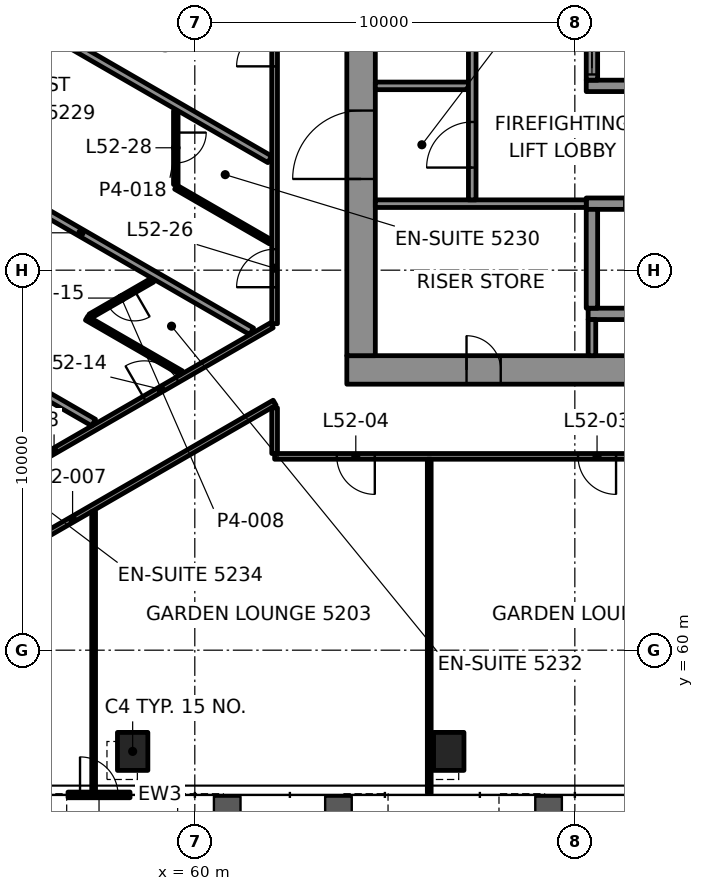
"""IFC4 building model, lengths in metres.
Left out: names, types, materials, properties, quantities, classifications, styles, units other than length and angle.
Written with IfcOpenShell. Run it as: python <this file> out.ifc"""

import sys

from ifc_helpers import new_model, si_unit, direction, frame, frame_2d, origin, origin_2d, place, context, subcontext, project, spatial, rectangle, hollow_rectangle, extrude, element, fill, save


model = new_model("IFC4")
c1 = context("Model", 3, precision=1e-05, world=origin(), true_north=direction((0.0, 1.0)))
c2 = subcontext(c1, "Body", "Model", "MODEL_VIEW")
j1 = project(units=[si_unit("LENGTHUNIT", "METRE"), si_unit("PLANEANGLEUNIT", "RADIAN")], contexts=[c1])
p1 = place(None, origin())
s1 = spatial("IfcSite", under=j1, at=p1, CompositionType="ELEMENT")
p2 = place(p1, origin())
s2 = spatial("IfcBuilding", under=s1, at=p2, CompositionType="ELEMENT")
p3 = place(p2, frame((0.0, 0.0, 222.1)))
s3 = spatial("IfcBuildingStorey", under=s2, at=p3, CompositionType="ELEMENT", Elevation=222.1)
for number, where, z_axis, x_axis in (
    (1, (58.365, 57.337, -0.0), (0.0, 0.0, 1.0), (1.0, 0.0, 0.0)),
    (2, (66.682, 57.337, -0.0), (0.0, 0.0, 1.0), (1.0, 0.0, 0.0)),
):
    element("IfcColumn", number, at=place(p3, frame(where, z_axis=z_axis, x_axis=x_axis)), inside=s3, PredefinedType="COLUMN", context=c2, shape_type="SweptSolid", body=[
        extrude(hollow_rectangle(XDim=0.8, YDim=1.0, WallThickness=0.05, at=origin_2d()), origin(), (0.0, 0.0, 1.0), 3.9),
    ])
p4 = place(p3, frame((64.0, 67.375, 0.0), z_axis=(0.0, 0.0, 1.0), x_axis=(1.0, 0.0, 0.0)))
e3 = element("IfcWall", 3, at=p4, inside=s3, PredefinedType="SHEAR", context=c2, shape_type="SweptSolid", body=[
    extrude(rectangle(XDim=22.0, YDim=0.75, at=frame_2d((11.0, 0.0))), origin(), (0.0, 0.0, 1.0), 3.7),
])
p5 = place(p4, frame((3.15, 0.0, 0.0)))
e4 = element("IfcOpeningElement", 4, at=p5, cuts=e3, PredefinedType="OPENING", context=c2, shape_type="SweptSolid", body=[
    extrude(rectangle(XDim=0.9, YDim=2.1, at=frame_2d((0.45, 1.05))), frame((0.0, 0.385, 0.0), z_axis=(0.0, -1.0, 0.0), x_axis=(1.0, 0.0, 0.0)), (0.0, 0.0, 1.0), 0.77),
])
p6 = place(p3, frame((64.375, 67.75, 0.0), z_axis=(0.0, 0.0, 1.0), x_axis=(0.0, 1.0, 0.0)))
e5 = element("IfcWall", 5, at=p6, inside=s3, PredefinedType="SHEAR", context=c2, shape_type="SweptSolid", body=[
    extrude(rectangle(XDim=14.5, YDim=0.75, at=frame_2d((7.25, 0.0))), origin(), (0.0, 0.0, 1.0), 3.7),
])
p7 = place(p6, frame((4.65, 0.0, 0.0)))
e6 = element("IfcOpeningElement", 6, at=p7, cuts=e5, PredefinedType="OPENING", context=c2, shape_type="SweptSolid", body=[
    extrude(rectangle(XDim=1.8, YDim=2.1, at=frame_2d((0.9, 1.05))), frame((0.0, 0.385, 0.0), z_axis=(0.0, -1.0, 0.0), x_axis=(1.0, 0.0, 0.0)), (0.0, 0.0, 1.0), 0.77),
])
p8 = place(p6, frame((8.5, 0.0, 0.0)))
e7 = element("IfcOpeningElement", 7, at=p8, cuts=e5, PredefinedType="OPENING", context=c2, shape_type="SweptSolid", body=[
    extrude(rectangle(XDim=0.9, YDim=2.1, at=frame_2d((0.45, 1.05))), frame((0.0, 0.385, 0.0), z_axis=(0.0, -1.0, 0.0), x_axis=(1.0, 0.0, 0.0)), (0.0, 0.0, 1.0), 0.77),
])
p9 = place(p6, frame((12.2, 0.0, 0.0)))
e8 = element("IfcOpeningElement", 8, at=p9, cuts=e5, PredefinedType="OPENING", context=c2, shape_type="SweptSolid", body=[
    extrude(rectangle(XDim=0.9, YDim=2.1, at=frame_2d((0.45, 1.05))), frame((0.0, 0.385, 0.0), z_axis=(0.0, -1.0, 0.0), x_axis=(1.0, 0.0, 0.0)), (0.0, 0.0, 1.0), 0.77),
])
p10 = place(p3, frame((70.35, 68.85, 0.0), z_axis=(0.0, 0.0, 1.0), x_axis=(1.0, 0.0, 0.0)))
e9 = element("IfcWall", 9, at=p10, inside=s3, PredefinedType="SHEAR", context=c2, shape_type="SweptSolid", body=[
    extrude(rectangle(XDim=14.2, YDim=0.3, at=frame_2d((7.1, 0.0))), origin(), (0.0, 0.0, 1.0), 3.7),
])
p11 = place(p3, frame((70.3, 71.75, 0.0), z_axis=(0.0, 0.0, 1.0), x_axis=(1.0, 0.0, 0.0)))
e10 = element("IfcWall", 10, at=p11, inside=s3, PredefinedType="SHEAR", context=c2, shape_type="SweptSolid", body=[
    extrude(rectangle(XDim=14.3, YDim=0.3, at=frame_2d((7.15, 0.0))), origin(), (0.0, 0.0, 1.0), 3.7),
])
p12 = place(p11, frame((1.0, 0.0, 0.0)))
e11 = element("IfcOpeningElement", 11, at=p12, cuts=e10, PredefinedType="OPENING", context=c2, shape_type="SweptSolid", body=[
    extrude(rectangle(XDim=1.1, YDim=2.1, at=frame_2d((0.55, 1.05))), frame((0.0, 0.16, 0.0), z_axis=(0.0, -1.0, 0.0), x_axis=(1.0, 0.0, 0.0)), (0.0, 0.0, 1.0), 0.32),
])
p13 = place(p11, frame((3.8, 0.0, 0.0)))
e12 = element("IfcOpeningElement", 12, at=p13, cuts=e10, PredefinedType="OPENING", context=c2, shape_type="SweptSolid", body=[
    extrude(rectangle(XDim=1.1, YDim=2.1, at=frame_2d((0.55, 1.05))), frame((0.0, 0.16, 0.0), z_axis=(0.0, -1.0, 0.0), x_axis=(1.0, 0.0, 0.0)), (0.0, 0.0, 1.0), 0.32),
])
p14 = place(p11, frame((6.6, 0.0, 0.0)))
e13 = element("IfcOpeningElement", 13, at=p14, cuts=e10, PredefinedType="OPENING", context=c2, shape_type="SweptSolid", body=[
    extrude(rectangle(XDim=1.1, YDim=2.1, at=frame_2d((0.55, 1.05))), frame((0.0, 0.16, 0.0), z_axis=(0.0, -1.0, 0.0), x_axis=(1.0, 0.0, 0.0)), (0.0, 0.0, 1.0), 0.32),
])
p15 = place(p11, frame((9.4, 0.0, 0.0)))
e14 = element("IfcOpeningElement", 14, at=p15, cuts=e10, PredefinedType="OPENING", context=c2, shape_type="SweptSolid", body=[
    extrude(rectangle(XDim=1.1, YDim=2.1, at=frame_2d((0.55, 1.05))), frame((0.0, 0.16, 0.0), z_axis=(0.0, -1.0, 0.0), x_axis=(1.0, 0.0, 0.0)), (0.0, 0.0, 1.0), 0.32),
])
p16 = place(p11, frame((12.2, 0.0, 0.0)))
e15 = element("IfcOpeningElement", 15, at=p16, cuts=e10, PredefinedType="OPENING", context=c2, shape_type="SweptSolid", body=[
    extrude(rectangle(XDim=1.1, YDim=2.1, at=frame_2d((0.55, 1.05))), frame((0.0, 0.16, 0.0), z_axis=(0.0, -1.0, 0.0), x_axis=(1.0, 0.0, 0.0)), (0.0, 0.0, 1.0), 0.32),
])
p17 = place(p3, frame((70.3, 74.85, 0.0), z_axis=(0.0, 0.0, 1.0), x_axis=(1.0, 0.0, 0.0)))
e16 = element("IfcWall", 16, at=p17, inside=s3, PredefinedType="SHEAR", context=c2, shape_type="SweptSolid", body=[
    extrude(rectangle(XDim=14.3, YDim=0.3, at=frame_2d((7.15, 0.0))), origin(), (0.0, 0.0, 1.0), 3.7),
])
p18 = place(p17, frame((3.8, 0.0, 0.0)))
e17 = element("IfcOpeningElement", 17, at=p18, cuts=e16, PredefinedType="OPENING", context=c2, shape_type="SweptSolid", body=[
    extrude(rectangle(XDim=1.1, YDim=2.1, at=frame_2d((0.55, 1.05))), frame((0.0, 0.16, 0.0), z_axis=(0.0, -1.0, 0.0), x_axis=(1.0, 0.0, 0.0)), (0.0, 0.0, 1.0), 0.32),
])
p19 = place(p17, frame((12.2, 0.0, 0.0)))
e18 = element("IfcOpeningElement", 18, at=p19, cuts=e16, PredefinedType="OPENING", context=c2, shape_type="SweptSolid", body=[
    extrude(rectangle(XDim=1.1, YDim=2.1, at=frame_2d((0.55, 1.05))), frame((0.0, 0.16, 0.0), z_axis=(0.0, -1.0, 0.0), x_axis=(1.0, 0.0, 0.0)), (0.0, 0.0, 1.0), 0.32),
])
p20 = place(p3, frame((70.45, 69.0, 0.0), z_axis=(0.0, 0.0, 1.0), x_axis=(0.0, 1.0, 0.0)))
e19 = element("IfcWall", 19, at=p20, inside=s3, PredefinedType="SHEAR", context=c2, shape_type="SweptSolid", body=[
    extrude(rectangle(XDim=2.6, YDim=0.3, at=frame_2d((1.3, 0.0))), origin(), (0.0, 0.0, 1.0), 3.7),
])
p21 = place(p3, frame((70.45, 75.0, 0.0), z_axis=(0.0, 0.0, 1.0), x_axis=(0.0, 1.0, 0.0)))
e20 = element("IfcWall", 20, at=p21, inside=s3, PredefinedType="SHEAR", context=c2, shape_type="SweptSolid", body=[
    extrude(rectangle(XDim=2.6, YDim=0.3, at=frame_2d((1.3, 0.0))), origin(), (0.0, 0.0, 1.0), 3.7),
])
p22 = place(p21, frame((0.15, 0.0, 0.0)))
e21 = element("IfcOpeningElement", 21, at=p22, cuts=e20, PredefinedType="OPENING", context=c2, shape_type="SweptSolid", body=[
    extrude(rectangle(XDim=1.1, YDim=2.1, at=frame_2d((0.55, 1.05))), frame((0.0, 0.16, 0.0), z_axis=(0.0, -1.0, 0.0), x_axis=(1.0, 0.0, 0.0)), (0.0, 0.0, 1.0), 0.32),
])
p23 = place(p3, frame((87.899, 65.1, 0.0), z_axis=(0.0, 0.0, 1.0), x_axis=(-1.0, 0.0, 0.0)))
e22 = element("IfcWall", 22, at=p23, inside=s3, PredefinedType="PARTITIONING", context=c2, shape_type="SweptSolid", body=[
    extrude(rectangle(XDim=25.799, YDim=0.15, at=frame_2d((12.899, 0.0))), origin(), (0.0, 0.0, 1.0), 3.1),
])
p24 = place(p23, frame((1.636, 0.0, 0.0)))
e23 = element("IfcOpeningElement", 23, at=p24, cuts=e22, PredefinedType="OPENING", context=c2, shape_type="SweptSolid", body=[
    extrude(rectangle(XDim=1.0, YDim=2.1, at=frame_2d((0.5, 1.05))), frame((0.0, 0.085, 0.0), z_axis=(0.0, -1.0, 0.0), x_axis=(1.0, 0.0, 0.0)), (0.0, 0.0, 1.0), 0.17),
])
p25 = place(p23, frame((7.984, 0.0, 0.0)))
e24 = element("IfcOpeningElement", 24, at=p25, cuts=e22, PredefinedType="OPENING", context=c2, shape_type="SweptSolid", body=[
    extrude(rectangle(XDim=1.0, YDim=2.1, at=frame_2d((0.5, 1.05))), frame((0.0, 0.085, 0.0), z_axis=(0.0, -1.0, 0.0), x_axis=(1.0, 0.0, 0.0)), (0.0, 0.0, 1.0), 0.17),
])
p26 = place(p23, frame((16.815, 0.0, 0.0)))
e25 = element("IfcOpeningElement", 25, at=p26, cuts=e22, PredefinedType="OPENING", context=c2, shape_type="SweptSolid", body=[
    extrude(rectangle(XDim=1.0, YDim=2.1, at=frame_2d((0.5, 1.05))), frame((0.0, 0.085, 0.0), z_axis=(0.0, -1.0, 0.0), x_axis=(1.0, 0.0, 0.0)), (0.0, 0.0, 1.0), 0.17),
])
p27 = place(p23, frame((23.163, 0.0, 0.0)))
e26 = element("IfcOpeningElement", 26, at=p27, cuts=e22, PredefinedType="OPENING", context=c2, shape_type="SweptSolid", body=[
    extrude(rectangle(XDim=1.0, YDim=2.1, at=frame_2d((0.5, 1.05))), frame((0.0, 0.085, 0.0), z_axis=(0.0, -1.0, 0.0), x_axis=(1.0, 0.0, 0.0)), (0.0, 0.0, 1.0), 0.17),
])
p28 = place(p3, frame((62.1, 66.513, 0.0), z_axis=(0.0, 0.0, 1.0), x_axis=(-0.866027942666, -0.499995602502, 0.0)))
e27 = element("IfcWall", 27, at=p28, inside=s3, PredefinedType="PARTITIONING", context=c2, shape_type="SweptSolid", body=[
    extrude(rectangle(XDim=12.276, YDim=0.15, at=frame_2d((6.138, 0.0))), origin(), (0.0, 0.0, 1.0), 2.947),
])
p29 = place(p28, frame((8.286, 0.0, 0.0)))
e28 = element("IfcOpeningElement", 28, at=p29, cuts=e27, PredefinedType="OPENING", context=c2, shape_type="SweptSolid", body=[
    extrude(rectangle(XDim=1.0, YDim=2.1, at=frame_2d((0.5, 1.05))), frame((0.0, 0.085, 0.0), z_axis=(0.0, -1.0, 0.0), x_axis=(1.0, 0.0, 0.0)), (0.0, 0.0, 1.0), 0.17),
])
p30 = place(p3, frame((50.569, 61.934, 0.0), z_axis=(0.0, 0.0, 1.0), x_axis=(0.866030071145, 0.499991915808, 0.0)))
e29 = element("IfcWall", 29, at=p30, inside=s3, PredefinedType="PARTITIONING", context=c2, shape_type="SweptSolid", body=[
    extrude(rectangle(XDim=13.228, YDim=0.15, at=frame_2d((6.614, 0.0))), origin(), (0.0, 0.0, 1.0), 3.1),
])
p31 = place(p30, frame((1.597, 0.0, 0.0)))
e30 = element("IfcOpeningElement", 30, at=p31, cuts=e29, PredefinedType="OPENING", context=c2, shape_type="SweptSolid", body=[
    extrude(rectangle(XDim=1.0, YDim=2.1, at=frame_2d((0.5, 1.05))), frame((0.0, 0.085, 0.0), z_axis=(0.0, -1.0, 0.0), x_axis=(1.0, 0.0, 0.0)), (0.0, 0.0, 1.0), 0.17),
])
p32 = place(p30, frame((9.36, 0.0, 0.0)))
e31 = element("IfcOpeningElement", 31, at=p32, cuts=e29, PredefinedType="OPENING", context=c2, shape_type="SweptSolid", body=[
    extrude(rectangle(XDim=1.0, YDim=2.1, at=frame_2d((0.5, 1.05))), frame((0.0, 0.085, 0.0), z_axis=(0.0, -1.0, 0.0), x_axis=(1.0, 0.0, 0.0)), (0.0, 0.0, 1.0), 0.17),
])
p33 = place(p3, frame((58.889, 69.74, 0.0), z_axis=(0.0, 0.0, 1.0), x_axis=(-0.866039783157, -0.499975093369, 0.0)))
e32 = element("IfcWall", 32, at=p33, inside=s3, PredefinedType="PARTITIONING", context=c2, shape_type="SweptSolid", body=[
    extrude(rectangle(XDim=1.896, YDim=0.12, at=frame_2d((0.948, 0.0))), origin(), (0.0, 0.0, 1.0), 3.1),
])
p34 = place(p33, frame((0.548, 0.0, 0.0)))
e33 = element("IfcOpeningElement", 33, at=p34, cuts=e32, PredefinedType="OPENING", context=c2, shape_type="SweptSolid", body=[
    extrude(rectangle(XDim=0.8, YDim=2.1, at=frame_2d((0.4, 1.05))), frame((0.0, 0.07, 0.0), z_axis=(0.0, -1.0, 0.0), x_axis=(1.0, 0.0, 0.0)), (0.0, 0.0, 1.0), 0.14),
])
p35 = place(p3, frame((66.169, 56.237, 0.0), z_axis=(0.0, 0.0, 1.0), x_axis=(0.0, 1.0, 0.0)))
e34 = element("IfcWall", 34, at=p35, inside=s3, PredefinedType="PARTITIONING", context=c2, shape_type="SweptSolid", body=[
    extrude(rectangle(XDim=8.788, YDim=0.1, at=frame_2d((4.394, 0.0))), origin(), (0.0, 0.0, 1.0), 3.022),
])
p36 = place(p3, frame((62.1, 65.176, 0.0), z_axis=(0.0, 0.0, 1.0), x_axis=(0.0, 1.0, 0.0)))
e35 = element("IfcWall", 35, at=p36, inside=s3, PredefinedType="PARTITIONING", context=c2, shape_type="SweptSolid", body=[
    extrude(rectangle(XDim=1.201, YDim=0.15, at=frame_2d((0.6, 0.0))), origin(), (0.0, 0.0, 1.0), 2.947),
])
p37 = place(p3, frame((62.1, 68.591, 0.0), z_axis=(0.0, 0.0, 1.0), x_axis=(0.0, 1.0, 0.0)))
e36 = element("IfcWall", 36, at=p37, inside=s3, PredefinedType="PARTITIONING", context=c2, shape_type="SweptSolid", body=[
    extrude(rectangle(XDim=16.308, YDim=0.15, at=frame_2d((8.154, 0.0))), origin(), (0.0, 0.0, 1.0), 3.1),
])
p38 = place(p37, frame((0.96, 0.0, 0.0)))
e37 = element("IfcOpeningElement", 37, at=p38, cuts=e36, PredefinedType="OPENING", context=c2, shape_type="SweptSolid", body=[
    extrude(rectangle(XDim=1.0, YDim=2.1, at=frame_2d((0.5, 1.05))), frame((0.0, 0.085, 0.0), z_axis=(0.0, -1.0, 0.0), x_axis=(1.0, 0.0, 0.0)), (0.0, 0.0, 1.0), 0.17),
])
p39 = place(p37, frame((6.772, 0.0, 0.0)))
e38 = element("IfcOpeningElement", 38, at=p39, cuts=e36, PredefinedType="OPENING", context=c2, shape_type="SweptSolid", body=[
    extrude(rectangle(XDim=1.0, YDim=2.1, at=frame_2d((0.5, 1.05))), frame((0.0, 0.085, 0.0), z_axis=(0.0, -1.0, 0.0), x_axis=(1.0, 0.0, 0.0)), (0.0, 0.0, 1.0), 0.17),
])
p40 = place(p3, frame((59.5, 74.189, 0.0), z_axis=(0.0, 0.0, 1.0), x_axis=(0.0, -1.0, 0.0)))
e39 = element("IfcWall", 39, at=p40, inside=s3, PredefinedType="PARTITIONING", context=c2, shape_type="SweptSolid", body=[
    extrude(rectangle(XDim=1.936, YDim=0.12, at=frame_2d((0.968, 0.0))), origin(), (0.0, 0.0, 1.0), 3.1),
])
p41 = place(p40, frame((0.568, 0.0, 0.0)))
e40 = element("IfcOpeningElement", 40, at=p41, cuts=e39, PredefinedType="OPENING", context=c2, shape_type="SweptSolid", body=[
    extrude(rectangle(XDim=0.8, YDim=2.1, at=frame_2d((0.4, 1.05))), frame((0.0, 0.07, 0.0), z_axis=(0.0, -1.0, 0.0), x_axis=(1.0, 0.0, 0.0)), (0.0, 0.0, 1.0), 0.14),
])
p42 = place(p3, frame((57.338, 56.312, 0.0), z_axis=(0.0, 0.0, 1.0), x_axis=(0.0, 1.0, 0.0)))
e41 = element("IfcWall", 41, at=p42, inside=s3, PredefinedType="PARTITIONING", context=c2, shape_type="SweptSolid", body=[
    extrude(rectangle(XDim=7.335, YDim=0.1, at=frame_2d((3.668, 0.0))), origin(), (0.0, 0.0, 1.0), 3.1),
])
p43 = place(p3, frame((61.973, 72.917, 0.0), z_axis=(0.0, 0.0, 1.0), x_axis=(-0.866027621823, 0.499996158224, 0.0)))
e42 = element("IfcWall", 42, at=p43, inside=s3, PredefinedType="PARTITIONING", context=c2, shape_type="SweptSolid", body=[
    extrude(rectangle(XDim=6.923, YDim=0.2, at=frame_2d((3.462, 0.0))), origin(), (0.0, 0.0, 1.0), 3.1),
])
p44 = place(p3, frame((61.99, 70.746, 0.0), z_axis=(0.0, 0.0, 1.0), x_axis=(-0.86600886466, 0.50002864551, 0.0)))
e43 = element("IfcWall", 43, at=p44, inside=s3, PredefinedType="PARTITIONING", context=c2, shape_type="SweptSolid", body=[
    extrude(rectangle(XDim=2.876, YDim=0.12, at=frame_2d((1.438, 0.0))), origin(), (0.0, 0.0, 1.0), 3.1),
])
p45 = place(p3, frame((61.497, 68.39, 0.0), z_axis=(0.0, 0.0, 1.0), x_axis=(-0.866030396021, 0.499991353094, 0.0)))
e44 = element("IfcWall", 44, at=p45, inside=s3, PredefinedType="PARTITIONING", context=c2, shape_type="SweptSolid", body=[
    extrude(rectangle(XDim=10.374, YDim=0.2, at=frame_2d((5.187, 0.0))), origin(), (0.0, 0.0, 1.0), 3.022),
])
p46 = place(p3, frame((59.643, 67.299, 0.0), z_axis=(0.0, 0.0, 1.0), x_axis=(-0.86600886466, 0.50002864551, 0.0)))
e45 = element("IfcWall", 45, at=p46, inside=s3, PredefinedType="PARTITIONING", context=c2, shape_type="SweptSolid", body=[
    extrude(rectangle(XDim=2.876, YDim=0.12, at=frame_2d((1.438, 0.0))), origin(), (0.0, 0.0, 1.0), 3.1),
])
p47 = place(p3, frame((57.338, 65.989, 0.0), z_axis=(0.0, 0.0, 1.0), x_axis=(-0.866008861407, 0.500028651143, 0.0)))
e46 = element("IfcWall", 46, at=p47, inside=s3, PredefinedType="PARTITIONING", context=c2, shape_type="SweptSolid", body=[
    extrude(rectangle(XDim=6.373, YDim=0.2, at=frame_2d((3.187, 0.0))), origin(), (0.0, 0.0, 1.0), 3.1),
])
p48 = place(p3, frame((64.75, 71.75, 0.0), z_axis=(0.0, 0.0, 1.0), x_axis=(1.0, 0.0, 0.0)))
e47 = element("IfcWall", 47, at=p48, inside=s3, PredefinedType="PARTITIONING", context=c2, shape_type="SweptSolid", body=[
    extrude(rectangle(XDim=5.55, YDim=0.2, at=frame_2d((2.775, 0.0))), origin(), (0.0, 0.0, 1.0), 3.7),
])
p49 = place(p3, frame((64.75, 74.85, 0.0), z_axis=(0.0, 0.0, 1.0), x_axis=(1.0, 0.0, 0.0)))
e48 = element("IfcWall", 48, at=p49, inside=s3, PredefinedType="PARTITIONING", context=c2, shape_type="SweptSolid", body=[
    extrude(rectangle(XDim=2.45, YDim=0.2, at=frame_2d((1.225, 0.0))), origin(), (0.0, 0.0, 1.0), 3.7),
])
p50 = place(p3, frame((67.3, 71.85, 0.0), z_axis=(0.0, 0.0, 1.0), x_axis=(0.0, 1.0, 0.0)))
e49 = element("IfcWall", 49, at=p50, inside=s3, PredefinedType="PARTITIONING", context=c2, shape_type="SweptSolid", body=[
    extrude(rectangle(XDim=5.75, YDim=0.2, at=frame_2d((2.875, 0.0))), origin(), (0.0, 0.0, 1.0), 3.7),
])
p51 = place(p50, frame((0.85, 0.0, 0.0)))
e50 = element("IfcOpeningElement", 50, at=p51, cuts=e49, PredefinedType="OPENING", context=c2, shape_type="SweptSolid", body=[
    extrude(rectangle(XDim=1.2, YDim=2.1, at=frame_2d((0.6, 1.05))), frame((0.0, 0.11, 0.0), z_axis=(0.0, -1.0, 0.0), x_axis=(1.0, 0.0, 0.0)), (0.0, 0.0, 1.0), 0.22),
])
p52 = place(p3, frame((70.45, 67.75, 0.0), z_axis=(0.0, 0.0, 1.0), x_axis=(0.0, 1.0, 0.0)))
e51 = element("IfcWall", 51, at=p52, inside=s3, PredefinedType="PARTITIONING", context=c2, shape_type="SweptSolid", body=[
    extrude(rectangle(XDim=0.95, YDim=0.2, at=frame_2d((0.475, 0.0))), origin(), (0.0, 0.0, 1.0), 3.7),
])
p53 = place(p26, origin())
e52 = element("IfcDoor", 52, at=p53, inside=s3, OperationType="SINGLE_SWING_RIGHT", PredefinedType="DOOR", context=c2, shape_type="SweptSolid", body=[
    extrude(rectangle(XDim=1.0, YDim=2.1, at=frame_2d((0.5, 1.05))), frame((0.0, 0.025, 0.0), z_axis=(0.0, -1.0, 0.0), x_axis=(1.0, 0.0, 0.0)), (0.0, 0.0, 1.0), 0.05),
])
fill(e25, e52)
p54 = place(p27, origin())
e53 = element("IfcDoor", 53, at=p54, inside=s3, OperationType="SINGLE_SWING_LEFT", PredefinedType="DOOR", context=c2, shape_type="SweptSolid", body=[
    extrude(rectangle(XDim=1.0, YDim=2.1, at=frame_2d((0.5, 1.05))), frame((0.0, 0.025, 0.0), z_axis=(0.0, -1.0, 0.0), x_axis=(1.0, 0.0, 0.0)), (0.0, 0.0, 1.0), 0.05),
])
fill(e26, e53)
p55 = place(p32, origin())
e54 = element("IfcDoor", 54, at=p55, inside=s3, OperationType="SINGLE_SWING_RIGHT", PredefinedType="DOOR", context=c2, shape_type="SweptSolid", body=[
    extrude(rectangle(XDim=1.0, YDim=2.1, at=frame_2d((0.5, 1.05))), frame((0.0, 0.025, 0.0), z_axis=(0.0, -1.0, 0.0), x_axis=(1.0, 0.0, 0.0)), (0.0, 0.0, 1.0), 0.05),
])
fill(e31, e54)
p56 = place(p34, origin())
e55 = element("IfcDoor", 55, at=p56, inside=s3, OperationType="SINGLE_SWING_RIGHT", PredefinedType="DOOR", context=c2, shape_type="SweptSolid", body=[
    extrude(rectangle(XDim=0.8, YDim=2.1, at=frame_2d((0.4, 1.05))), frame((0.0, 0.025, 0.0), z_axis=(0.0, -1.0, 0.0), x_axis=(1.0, 0.0, 0.0)), (0.0, 0.0, 1.0), 0.05),
])
fill(e33, e55)
p57 = place(p38, origin())
e56 = element("IfcDoor", 56, at=p57, inside=s3, OperationType="SINGLE_SWING_RIGHT", PredefinedType="DOOR", context=c2, shape_type="SweptSolid", body=[
    extrude(rectangle(XDim=1.0, YDim=2.1, at=frame_2d((0.5, 1.05))), frame((0.0, 0.025, 0.0), z_axis=(0.0, -1.0, 0.0), x_axis=(1.0, 0.0, 0.0)), (0.0, 0.0, 1.0), 0.05),
])
fill(e37, e56)
p58 = place(p39, origin())
e57 = element("IfcDoor", 57, at=p58, inside=s3, OperationType="SINGLE_SWING_RIGHT", PredefinedType="DOOR", context=c2, shape_type="SweptSolid", body=[
    extrude(rectangle(XDim=1.0, YDim=2.1, at=frame_2d((0.5, 1.05))), frame((0.0, 0.025, 0.0), z_axis=(0.0, -1.0, 0.0), x_axis=(1.0, 0.0, 0.0)), (0.0, 0.0, 1.0), 0.05),
])
fill(e38, e57)
p59 = place(p41, origin())
e58 = element("IfcDoor", 58, at=p59, inside=s3, OperationType="SINGLE_SWING_RIGHT", PredefinedType="DOOR", context=c2, shape_type="SweptSolid", body=[
    extrude(rectangle(XDim=0.8, YDim=2.1, at=frame_2d((0.4, 1.05))), frame((0.0, 0.025, 0.0), z_axis=(0.0, -1.0, 0.0), x_axis=(1.0, 0.0, 0.0)), (0.0, 0.0, 1.0), 0.05),
])
fill(e40, e58)
p60 = place(p3, frame((56.664, 56.192, 0.0), z_axis=(0.0, 0.0, 1.0), x_axis=(1.0, 0.0, 0.0)))
p61 = place(p60, frame((0.316, 0.0, 0.0)))
p62 = place(p61, origin())
e59 = element("IfcDoor", 59, at=p62, inside=s3, OperationType="SINGLE_SWING_LEFT", PredefinedType="DOOR", context=c2, shape_type="SweptSolid", body=[
    extrude(rectangle(XDim=1.0, YDim=2.1, at=frame_2d((0.5, 1.05))), frame((0.0, 0.025, 0.0), z_axis=(0.0, -1.0, 0.0), x_axis=(1.0, 0.0, 0.0)), (0.0, 0.0, 1.0), 0.05),
])
p63 = place(p22, origin())
e60 = element("IfcDoor", 60, at=p63, inside=s3, OperationType="DOUBLE_DOOR_SLIDING", PredefinedType="DOOR", context=c2, shape_type="SweptSolid", body=[
    extrude(rectangle(XDim=1.1, YDim=2.1, at=frame_2d((0.55, 1.05))), frame((0.0, 0.025, 0.0), z_axis=(0.0, -1.0, 0.0), x_axis=(1.0, 0.0, 0.0)), (0.0, 0.0, 1.0), 0.05),
])
fill(e21, e60)
p64 = place(p51, origin())
e61 = element("IfcDoor", 61, at=p64, inside=s3, OperationType="SINGLE_SWING_RIGHT", PredefinedType="DOOR", context=c2, shape_type="SweptSolid", body=[
    extrude(rectangle(XDim=1.2, YDim=2.1, at=frame_2d((0.6, 1.05))), frame((0.0, 0.025, 0.0), z_axis=(0.0, -1.0, 0.0), x_axis=(1.0, 0.0, 0.0)), (0.0, 0.0, 1.0), 0.05),
])
fill(e50, e61)
p65 = place(p7, origin())
e62 = element("IfcDoor", 62, at=p65, inside=s3, OperationType="SINGLE_SWING_LEFT", PredefinedType="DOOR", context=c2, shape_type="SweptSolid", body=[
    extrude(rectangle(XDim=1.8, YDim=2.1, at=frame_2d((0.9, 1.05))), frame((0.0, 0.095, 0.0), z_axis=(0.0, -1.0, 0.0), x_axis=(1.0, 0.0, 0.0)), (0.0, 0.0, 1.0), 0.19),
])
fill(e6, e62)
p66 = place(p5, origin())
e63 = element("IfcDoor", 63, at=p66, inside=s3, OperationType="SINGLE_SWING_LEFT", PredefinedType="DOOR", context=c2, shape_type="SweptSolid", body=[
    extrude(rectangle(XDim=0.9, YDim=2.1, at=frame_2d((0.45, 1.05))), frame((0.0, 0.095, 0.0), z_axis=(0.0, -1.0, 0.0), x_axis=(1.0, 0.0, 0.0)), (0.0, 0.0, 1.0), 0.19),
])
fill(e4, e63)
save(model, sys.argv[1])
